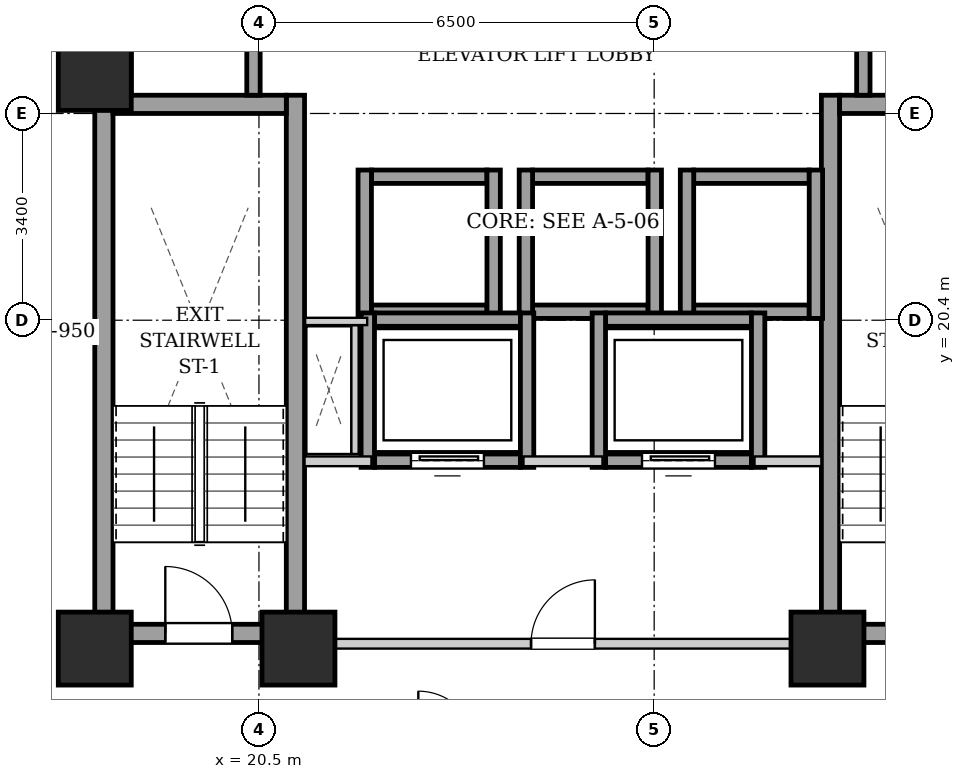
"""IFC4 building model, lengths in metres.
Left out: names, types, materials, properties, quantities, classifications, styles, units other than length and angle.
Written with IfcOpenShell. Run it as: python <this file> out.ifc"""

import sys

from ifc_helpers import new_model, si_unit, direction, frame, frame_2d, origin, origin_2d, place, context, subcontext, project, spatial, rectangle, extrude, element, fill, save


model = new_model("IFC4")
c1 = context("Model", 3, precision=1e-05, world=origin(), true_north=direction((0.0, 1.0)))
c2 = subcontext(c1, "Body", "Model", "MODEL_VIEW")
j1 = project(units=[si_unit("LENGTHUNIT", "METRE"), si_unit("PLANEANGLEUNIT", "RADIAN")], contexts=[c1])
p1 = place(None, origin())
s1 = spatial("IfcSite", under=j1, at=p1, CompositionType="ELEMENT")
p2 = place(p1, origin())
s2 = spatial("IfcBuilding", under=s1, at=p2, CompositionType="ELEMENT")
p3 = place(p2, frame((0.0, 0.0, 61.0)))
s3 = spatial("IfcBuildingStorey", under=s2, at=p3, CompositionType="ELEMENT", Elevation=61.0)
for number, where, z_axis, x_axis in (
    (1, (17.8, 15.0, 0.0), (0.0, 0.0, 1.0), (1.0, 0.0, 0.0)),
    (2, (21.15, 15.0, 0.0), (0.0, 0.0, 1.0), (1.0, 0.0, 0.0)),
    (3, (29.85, 15.0, 0.0), (0.0, 0.0, 1.0), (1.0, 0.0, 0.0)),
    (4, (17.8, 24.45, 0.0), (0.0, 0.0, 1.0), (1.0, 0.0, 0.0)),
):
    element("IfcColumn", number, at=place(p3, frame(where, z_axis=z_axis, x_axis=x_axis)), inside=s3, PredefinedType="COLUMN", context=c2, shape_type="SweptSolid", body=[
        extrude(rectangle(XDim=1.2, YDim=1.2, at=origin_2d()), origin(), (0.0, 0.0, 1.0), 3.2),
    ])
for number, where, z_axis, x_axis in (
    (5, (17.95, 15.1, 0.0), (0.0, 0.0, 1.0), (0.0, 1.0, 0.0)),
    (6, (21.1, 15.1, 0.0), (0.0, 0.0, 1.0), (0.0, 1.0, 0.0)),
):
    element("IfcWall", number, at=place(p3, frame(where, z_axis=z_axis, x_axis=x_axis)), inside=s3, PredefinedType="SHEAR", context=c2, shape_type="SweptSolid", body=[
        extrude(rectangle(XDim=9.0, YDim=0.3, at=frame_2d((4.5, 0.0))), origin(), (0.0, 0.0, 1.0), 2.94),
    ])
p4 = place(p3, frame((18.1, 23.95, 0.0), z_axis=(0.0, 0.0, 1.0), x_axis=(1.0, 0.0, 0.0)))
e7 = element("IfcWall", 7, at=p4, inside=s3, PredefinedType="SHEAR", context=c2, shape_type="SweptSolid", body=[
    extrude(rectangle(XDim=2.85, YDim=0.3, at=frame_2d((1.425, 0.0))), origin(), (0.0, 0.0, 1.0), 2.94),
])
p5 = place(p3, frame((18.1, 15.25, 0.0), z_axis=(0.0, 0.0, 1.0), x_axis=(1.0, 0.0, 0.0)))
e8 = element("IfcWall", 8, at=p5, inside=s3, PredefinedType="SHEAR", context=c2, shape_type="SweptSolid", body=[
    extrude(rectangle(XDim=2.85, YDim=0.3, at=frame_2d((1.425, 0.0))), origin(), (0.0, 0.0, 1.0), 2.94),
])
p6 = place(p5, frame((0.86, 0.0, 0.0)))
e9 = element("IfcOpeningElement", 9, at=p6, cuts=e8, PredefinedType="OPENING", context=c2, shape_type="SweptSolid", body=[
    extrude(rectangle(XDim=1.1, YDim=2.05, at=frame_2d((0.55, 1.025))), frame((0.0, 0.16, 0.0), z_axis=(0.0, -1.0, 0.0), x_axis=(1.0, 0.0, 0.0)), (0.0, 0.0, 1.0), 0.32),
])
p7 = place(p3, frame((29.9, 15.1, 0.0), z_axis=(0.0, 0.0, 1.0), x_axis=(0.0, 1.0, 0.0)))
e10 = element("IfcWall", 10, at=p7, inside=s3, PredefinedType="SHEAR", context=c2, shape_type="SweptSolid", body=[
    extrude(rectangle(XDim=9.0, YDim=0.3, at=frame_2d((4.5, 0.0))), origin(), (0.0, 0.0, 1.0), 2.94),
])
p8 = place(p3, frame((30.05, 23.95, 0.0), z_axis=(0.0, 0.0, 1.0), x_axis=(1.0, 0.0, 0.0)))
e11 = element("IfcWall", 11, at=p8, inside=s3, PredefinedType="SHEAR", context=c2, shape_type="SweptSolid", body=[
    extrude(rectangle(XDim=2.85, YDim=0.3, at=frame_2d((1.425, 0.0))), origin(), (0.0, 0.0, 1.0), 2.94),
])
p9 = place(p3, frame((30.05, 15.25, 0.0), z_axis=(0.0, 0.0, 1.0), x_axis=(1.0, 0.0, 0.0)))
e12 = element("IfcWall", 12, at=p9, inside=s3, PredefinedType="SHEAR", context=c2, shape_type="SweptSolid", body=[
    extrude(rectangle(XDim=2.85, YDim=0.3, at=frame_2d((1.425, 0.0))), origin(), (0.0, 0.0, 1.0), 2.94),
])
p10 = place(p9, frame((0.86, 0.0, 0.0)))
e13 = element("IfcOpeningElement", 13, at=p10, cuts=e12, PredefinedType="OPENING", context=c2, shape_type="SweptSolid", body=[
    extrude(rectangle(XDim=1.1, YDim=2.05, at=frame_2d((0.55, 1.025))), frame((0.0, 0.16, 0.0), z_axis=(0.0, -1.0, 0.0), x_axis=(1.0, 0.0, 0.0)), (0.0, 0.0, 1.0), 0.32),
])
for number, where, z_axis, x_axis in (
    (14, (22.35, 20.54, 0.0), (0.0, 0.0, 1.0), (1.0, 0.0, 0.0)),
    (15, (22.35, 22.76, 0.0), (0.0, 0.0, 1.0), (1.0, 0.0, 0.0)),
):
    element("IfcWall", number, at=place(p3, frame(where, z_axis=z_axis, x_axis=x_axis)), inside=s3, PredefinedType="SHEAR", context=c2, shape_type="SweptSolid", body=[
        extrude(rectangle(XDim=1.9, YDim=0.22, at=frame_2d((0.95, 0.0))), origin(), (0.0, 0.0, 1.0), 2.94),
    ])
for number, where, z_axis, x_axis in (
    (16, (22.24, 20.43, 0.0), (0.0, 0.0, 1.0), (0.0, 1.0, 0.0)),
    (17, (24.36, 20.43, 0.0), (0.0, 0.0, 1.0), (0.0, 1.0, 0.0)),
):
    element("IfcWall", number, at=place(p3, frame(where, z_axis=z_axis, x_axis=x_axis)), inside=s3, PredefinedType="SHEAR", context=c2, shape_type="SweptSolid", body=[
        extrude(rectangle(XDim=2.44, YDim=0.22, at=frame_2d((1.22, 0.0))), origin(), (0.0, 0.0, 1.0), 2.94),
    ])
for number, where, z_axis, x_axis in (
    (18, (25.0, 20.54, 0.0), (0.0, 0.0, 1.0), (1.0, 0.0, 0.0)),
    (19, (25.0, 22.76, 0.0), (0.0, 0.0, 1.0), (1.0, 0.0, 0.0)),
):
    element("IfcWall", number, at=place(p3, frame(where, z_axis=z_axis, x_axis=x_axis)), inside=s3, PredefinedType="SHEAR", context=c2, shape_type="SweptSolid", body=[
        extrude(rectangle(XDim=1.9, YDim=0.22, at=frame_2d((0.95, 0.0))), origin(), (0.0, 0.0, 1.0), 2.94),
    ])
for number, where, z_axis, x_axis in (
    (20, (24.89, 20.43, 0.0), (0.0, 0.0, 1.0), (0.0, 1.0, 0.0)),
    (21, (27.01, 20.43, 0.0), (0.0, 0.0, 1.0), (0.0, 1.0, 0.0)),
):
    element("IfcWall", number, at=place(p3, frame(where, z_axis=z_axis, x_axis=x_axis)), inside=s3, PredefinedType="SHEAR", context=c2, shape_type="SweptSolid", body=[
        extrude(rectangle(XDim=2.44, YDim=0.22, at=frame_2d((1.22, 0.0))), origin(), (0.0, 0.0, 1.0), 2.94),
    ])
for number, where, z_axis, x_axis in (
    (22, (27.65, 20.54, 0.0), (0.0, 0.0, 1.0), (1.0, 0.0, 0.0)),
    (23, (27.65, 22.76, 0.0), (0.0, 0.0, 1.0), (1.0, 0.0, 0.0)),
):
    element("IfcWall", number, at=place(p3, frame(where, z_axis=z_axis, x_axis=x_axis)), inside=s3, PredefinedType="SHEAR", context=c2, shape_type="SweptSolid", body=[
        extrude(rectangle(XDim=1.9, YDim=0.22, at=frame_2d((0.95, 0.0))), origin(), (0.0, 0.0, 1.0), 2.94),
    ])
for number, where, z_axis, x_axis in (
    (24, (27.54, 20.43, 0.0), (0.0, 0.0, 1.0), (0.0, 1.0, 0.0)),
    (25, (29.66, 20.43, 0.0), (0.0, 0.0, 1.0), (0.0, 1.0, 0.0)),
):
    element("IfcWall", number, at=place(p3, frame(where, z_axis=z_axis, x_axis=x_axis)), inside=s3, PredefinedType="SHEAR", context=c2, shape_type="SweptSolid", body=[
        extrude(rectangle(XDim=2.44, YDim=0.22, at=frame_2d((1.22, 0.0))), origin(), (0.0, 0.0, 1.0), 2.94),
    ])
p11 = place(p3, frame((18.29, 24.1, 0.0), z_axis=(0.0, 0.0, 1.0), x_axis=(0.0, 1.0, 0.0)))
e26 = element("IfcWall", 26, at=p11, inside=s3, PredefinedType="SHEAR", context=c2, shape_type="SweptSolid", body=[
    extrude(rectangle(XDim=4.14, YDim=0.22, at=frame_2d((2.07, 0.0))), origin(), (0.0, 0.0, 1.0), 2.94),
])
p12 = place(p3, frame((20.41, 24.1, 0.0), z_axis=(0.0, 0.0, 1.0), x_axis=(0.0, 1.0, 0.0)))
e27 = element("IfcWall", 27, at=p12, inside=s3, PredefinedType="SHEAR", context=c2, shape_type="SweptSolid", body=[
    extrude(rectangle(XDim=1.96, YDim=0.22, at=frame_2d((0.98, 0.0))), origin(), (0.0, 0.0, 1.0), 2.94),
])
p13 = place(p3, frame((30.44, 24.1, 0.0), z_axis=(0.0, 0.0, 1.0), x_axis=(0.0, 1.0, 0.0)))
e28 = element("IfcWall", 28, at=p13, inside=s3, PredefinedType="SHEAR", context=c2, shape_type="SweptSolid", body=[
    extrude(rectangle(XDim=2.07, YDim=0.22, at=frame_2d((1.035, 0.0))), origin(), (0.0, 0.0, 1.0), 2.94),
])
p14 = place(p3, frame((22.4, 18.09, 0.0), z_axis=(0.0, 0.0, 1.0), x_axis=(1.0, 0.0, 0.0)))
e29 = element("IfcWall", 29, at=p14, inside=s3, PredefinedType="SHEAR", context=c2, shape_type="SweptSolid", body=[
    extrude(rectangle(XDim=2.4, YDim=0.22, at=frame_2d((1.2, 0.0))), origin(), (0.0, 0.0, 1.0), 2.94),
])
p15 = place(p14, frame((0.6, 0.0, 0.0)))
e30 = element("IfcOpeningElement", 30, at=p15, cuts=e29, PredefinedType="OPENING", context=c2, shape_type="SweptSolid", body=[
    extrude(rectangle(XDim=1.2, YDim=2.15, at=frame_2d((0.6, 1.075))), frame((0.0, 0.12, 0.0), z_axis=(0.0, -1.0, 0.0), x_axis=(1.0, 0.0, 0.0)), (0.0, 0.0, 1.0), 0.24),
])
p16 = place(p3, frame((22.4, 20.41, 0.0), z_axis=(0.0, 0.0, 1.0), x_axis=(1.0, 0.0, 0.0)))
e31 = element("IfcWall", 31, at=p16, inside=s3, PredefinedType="SHEAR", context=c2, shape_type="SweptSolid", body=[
    extrude(rectangle(XDim=2.4, YDim=0.22, at=frame_2d((1.2, 0.0))), origin(), (0.0, 0.0, 1.0), 2.94),
])
for number, where, z_axis, x_axis in (
    (32, (22.29, 17.98, 0.0), (0.0, 0.0, 1.0), (0.0, 1.0, 0.0)),
    (33, (24.91, 17.98, 0.0), (0.0, 0.0, 1.0), (0.0, 1.0, 0.0)),
):
    element("IfcWall", number, at=place(p3, frame(where, z_axis=z_axis, x_axis=x_axis)), inside=s3, PredefinedType="SHEAR", context=c2, shape_type="SweptSolid", body=[
        extrude(rectangle(XDim=2.54, YDim=0.22, at=frame_2d((1.27, 0.0))), origin(), (0.0, 0.0, 1.0), 2.94),
    ])
p17 = place(p3, frame((26.2, 18.09, 0.0), z_axis=(0.0, 0.0, 1.0), x_axis=(1.0, 0.0, 0.0)))
e34 = element("IfcWall", 34, at=p17, inside=s3, PredefinedType="SHEAR", context=c2, shape_type="SweptSolid", body=[
    extrude(rectangle(XDim=2.4, YDim=0.22, at=frame_2d((1.2, 0.0))), origin(), (0.0, 0.0, 1.0), 2.94),
])
p18 = place(p17, frame((0.6, 0.0, 0.0)))
e35 = element("IfcOpeningElement", 35, at=p18, cuts=e34, PredefinedType="OPENING", context=c2, shape_type="SweptSolid", body=[
    extrude(rectangle(XDim=1.2, YDim=2.15, at=frame_2d((0.6, 1.075))), frame((0.0, 0.12, 0.0), z_axis=(0.0, -1.0, 0.0), x_axis=(1.0, 0.0, 0.0)), (0.0, 0.0, 1.0), 0.24),
])
p19 = place(p3, frame((26.2, 20.41, 0.0), z_axis=(0.0, 0.0, 1.0), x_axis=(1.0, 0.0, 0.0)))
e36 = element("IfcWall", 36, at=p19, inside=s3, PredefinedType="SHEAR", context=c2, shape_type="SweptSolid", body=[
    extrude(rectangle(XDim=2.4, YDim=0.22, at=frame_2d((1.2, 0.0))), origin(), (0.0, 0.0, 1.0), 2.94),
])
for number, where, z_axis, x_axis in (
    (37, (26.09, 17.98, 0.0), (0.0, 0.0, 1.0), (0.0, 1.0, 0.0)),
    (38, (28.71, 17.98, 0.0), (0.0, 0.0, 1.0), (0.0, 1.0, 0.0)),
):
    element("IfcWall", number, at=place(p3, frame(where, z_axis=z_axis, x_axis=x_axis)), inside=s3, PredefinedType="SHEAR", context=c2, shape_type="SweptSolid", body=[
        extrude(rectangle(XDim=2.54, YDim=0.22, at=frame_2d((1.27, 0.0))), origin(), (0.0, 0.0, 1.0), 2.94),
    ])
p20 = place(p3, frame((21.25, 15.08, 0.0), z_axis=(0.0, 0.0, 1.0), x_axis=(1.0, 0.0, 0.0)))
e39 = element("IfcWall", 39, at=p20, inside=s3, PredefinedType="PARTITIONING", context=c2, shape_type="SweptSolid", body=[
    extrude(rectangle(XDim=8.5, YDim=0.16, at=frame_2d((4.25, 0.0))), origin(), (0.0, 0.0, 1.0), 2.232),
])
p21 = place(p20, frame((3.725, 0.0, 0.0)))
e40 = element("IfcOpeningElement", 40, at=p21, cuts=e39, PredefinedType="OPENING", context=c2, shape_type="SweptSolid", body=[
    extrude(rectangle(XDim=1.05, YDim=2.05, at=frame_2d((0.525, 1.025))), frame((0.0, 0.09, 0.0), z_axis=(0.0, -1.0, 0.0), x_axis=(1.0, 0.0, 0.0)), (0.0, 0.0, 1.0), 0.18),
])
p22 = place(p3, frame((21.25, 18.08, 0.0), z_axis=(0.0, 0.0, 1.0), x_axis=(1.0, 0.0, 0.0)))
e41 = element("IfcWall", 41, at=p22, inside=s3, PredefinedType="PARTITIONING", context=c2, shape_type="SweptSolid", body=[
    extrude(rectangle(XDim=1.1, YDim=0.16, at=frame_2d((0.55, 0.0))), origin(), (0.0, 0.0, 1.0), 2.94),
])
p23 = place(p3, frame((24.85, 18.08, 0.0), z_axis=(0.0, 0.0, 1.0), x_axis=(1.0, 0.0, 0.0)))
e42 = element("IfcWall", 42, at=p23, inside=s3, PredefinedType="PARTITIONING", context=c2, shape_type="SweptSolid", body=[
    extrude(rectangle(XDim=1.3, YDim=0.16, at=frame_2d((0.65, 0.0))), origin(), (0.0, 0.0, 1.0), 2.94),
])
p24 = place(p3, frame((28.65, 18.08, 0.0), z_axis=(0.0, 0.0, 1.0), x_axis=(1.0, 0.0, 0.0)))
e43 = element("IfcWall", 43, at=p24, inside=s3, PredefinedType="PARTITIONING", context=c2, shape_type="SweptSolid", body=[
    extrude(rectangle(XDim=1.1, YDim=0.16, at=frame_2d((0.55, 0.0))), origin(), (0.0, 0.0, 1.0), 2.94),
])
p25 = place(p3, frame((17.88, 24.12, 0.0), z_axis=(0.0, 0.0, 1.0), x_axis=(0.0, 1.0, 0.0)))
e44 = element("IfcWall", 44, at=p25, inside=s3, PredefinedType="PARTITIONING", context=c2, shape_type="SweptSolid", body=[
    extrude(rectangle(XDim=4.76, YDim=0.16, at=frame_2d((2.38, 0.0))), origin(), (0.0, 0.0, 1.0), 2.94),
])
p26 = place(p3, frame((22.08, 18.2, 0.0), z_axis=(0.0, 0.0, 1.0), x_axis=(0.0, 1.0, 0.0)))
e45 = element("IfcWall", 45, at=p26, inside=s3, PredefinedType="PARTITIONING", context=c2, shape_type="SweptSolid", body=[
    extrude(rectangle(XDim=2.12, YDim=0.12, at=frame_2d((1.06, 0.0))), origin(), (0.0, 0.0, 1.0), 2.94),
])
p27 = place(p3, frame((22.28, 20.38, 0.0), z_axis=(0.0, 0.0, 1.0), x_axis=(-1.0, 0.0, 0.0)))
e46 = element("IfcWall", 46, at=p27, inside=s3, PredefinedType="PARTITIONING", context=c2, shape_type="SweptSolid", body=[
    extrude(rectangle(XDim=1.02, YDim=0.12, at=frame_2d((0.51, 0.0))), origin(), (0.0, 0.0, 1.0), 2.94),
])
p28 = place(p6, origin())
e47 = element("IfcDoor", 47, at=p28, inside=s3, OperationType="SINGLE_SWING_LEFT", PredefinedType="DOOR", context=c2, shape_type="SweptSolid", body=[
    extrude(rectangle(XDim=1.1, YDim=2.05, at=frame_2d((0.55, 1.025))), frame((0.0, 0.025, 0.0), z_axis=(0.0, -1.0, 0.0), x_axis=(1.0, 0.0, 0.0)), (0.0, 0.0, 1.0), 0.05),
])
fill(e9, e47)
p29 = place(p15, origin())
e48 = element("IfcDoor", 48, at=p29, inside=s3, OperationType="SLIDING_TO_LEFT", PredefinedType="DOOR", context=c2, shape_type="SweptSolid", body=[
    extrude(rectangle(XDim=1.2, YDim=2.15, at=frame_2d((0.6, 1.075))), frame((0.0, 0.025, 0.0), z_axis=(0.0, -1.0, 0.0), x_axis=(1.0, 0.0, 0.0)), (0.0, 0.0, 1.0), 0.05),
])
fill(e30, e48)
p30 = place(p18, origin())
e49 = element("IfcDoor", 49, at=p30, inside=s3, OperationType="SLIDING_TO_LEFT", PredefinedType="DOOR", context=c2, shape_type="SweptSolid", body=[
    extrude(rectangle(XDim=1.2, YDim=2.15, at=frame_2d((0.6, 1.075))), frame((0.0, 0.025, 0.0), z_axis=(0.0, -1.0, 0.0), x_axis=(1.0, 0.0, 0.0)), (0.0, 0.0, 1.0), 0.05),
])
fill(e35, e49)
p31 = place(p21, origin())
e50 = element("IfcDoor", 50, at=p31, inside=s3, OperationType="SINGLE_SWING_RIGHT", PredefinedType="DOOR", context=c2, shape_type="SweptSolid", body=[
    extrude(rectangle(XDim=1.05, YDim=2.05, at=frame_2d((0.525, 1.025))), frame((0.0, 0.025, 0.0), z_axis=(0.0, -1.0, 0.0), x_axis=(1.0, 0.0, 0.0)), (0.0, 0.0, 1.0), 0.05),
])
fill(e40, e50)
save(model, sys.argv[1])
